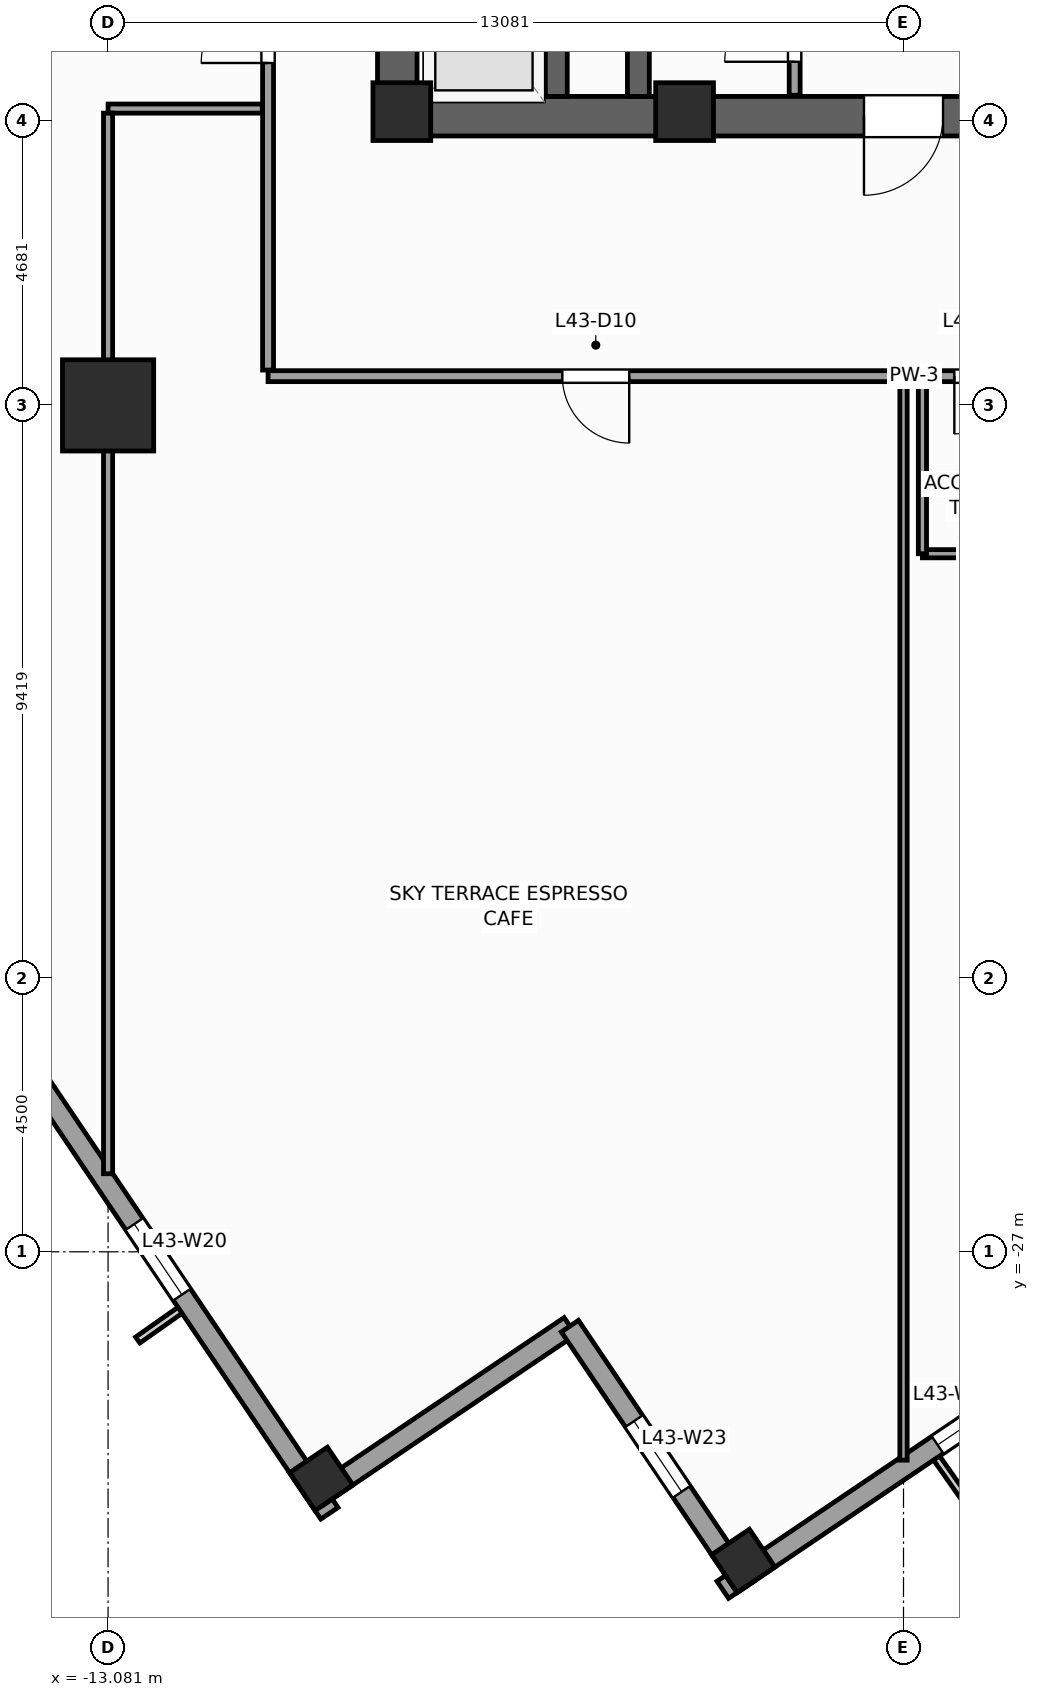
"""IFC4 building model, lengths in metres.
Left out: names, types, materials, properties, quantities, classifications, styles, units other than length and angle.
Written with IfcOpenShell. Run it as: python <this file> out.ifc"""

import sys

from ifc_helpers import new_model, si_unit, direction, frame, frame_2d, origin, origin_2d, place, context, subcontext, project, spatial, rectangle, extrude, source, transform, mapped, element, fill, save


model = new_model("IFC4")
c1 = context("Model", 3, precision=1e-05, world=origin(), true_north=direction((0.0, 1.0)))
c2 = subcontext(c1, "Body", "Model", "MODEL_VIEW")
j1 = project(units=[si_unit("LENGTHUNIT", "METRE"), si_unit("PLANEANGLEUNIT", "RADIAN")], contexts=[c1])
p1 = place(None, origin())
s1 = spatial("IfcSite", under=j1, at=p1, CompositionType="ELEMENT")
p2 = place(p1, origin())
s2 = spatial("IfcBuilding", under=s1, at=p2, CompositionType="ELEMENT")
p3 = place(p2, frame((0.0, 0.0, 180.4)))
s3 = spatial("IfcBuildingStorey", under=s2, at=p3, CompositionType="ELEMENT", Elevation=180.4)
p4 = place(p3, frame((-8.65, -8.325, 0.0), z_axis=(0.0, 0.0, 1.0), x_axis=(1.0, 0.0, 0.0)))
e1 = element("IfcWall", 1, at=p4, inside=s3, PredefinedType="SHEAR", context=c2, shape_type="SweptSolid", body=[
    extrude(rectangle(XDim=17.3, YDim=0.65, at=frame_2d((8.65, 0.0))), origin(), (0.0, 0.0, 1.0), 4.0),
])
p5 = place(p4, frame((8.0, 0.0, 0.0)))
e2 = element("IfcOpeningElement", 2, at=p5, cuts=e1, PredefinedType="OPENING", context=c2, shape_type="SweptSolid", body=[
    extrude(rectangle(XDim=1.3, YDim=2.2, at=frame_2d((0.65, 1.1))), frame((0.0, 0.335, 0.0), z_axis=(0.0, -1.0, 0.0), x_axis=(1.0, 0.0, 0.0)), (0.0, 0.0, 1.0), 0.67),
])
p6 = place(p3, frame((-8.325, -8.0, 0.0), z_axis=(0.0, 0.0, 1.0), x_axis=(0.0, 1.0, 0.0)))
e3 = element("IfcWall", 3, at=p6, inside=s3, PredefinedType="SHEAR", context=c2, shape_type="SweptSolid", body=[
    extrude(rectangle(XDim=16.0, YDim=0.65, at=frame_2d((8.0, 0.0))), origin(), (0.0, 0.0, 1.0), 4.0),
])
p7 = place(p6, frame((4.69, 0.0, 0.0)))
e4 = element("IfcOpeningElement", 4, at=p7, cuts=e3, PredefinedType="OPENING", context=c2, shape_type="SweptSolid", body=[
    extrude(rectangle(XDim=1.3, YDim=2.2, at=frame_2d((0.65, 1.1))), frame((0.0, 0.335, 0.0), z_axis=(0.0, -1.0, 0.0), x_axis=(1.0, 0.0, 0.0)), (0.0, 0.0, 1.0), 0.67),
])
p8 = place(p3, frame((-4.36, -8.0, 0.0), z_axis=(0.0, 0.0, 1.0), x_axis=(0.0, 1.0, 0.0)))
e5 = element("IfcWall", 5, at=p8, inside=s3, PredefinedType="SHEAR", context=c2, shape_type="SweptSolid", body=[
    extrude(rectangle(XDim=16.0, YDim=0.36, at=frame_2d((8.0, 0.0))), origin(), (0.0, 0.0, 1.0), 4.0),
])
p9 = place(p3, frame((-5.71, -8.0, 0.0), z_axis=(0.0, 0.0, 1.0), x_axis=(0.0, 1.0, 0.0)))
e6 = element("IfcWall", 6, at=p9, inside=s3, PredefinedType="SHEAR", context=c2, shape_type="SweptSolid", body=[
    extrude(rectangle(XDim=2.54, YDim=0.36, at=frame_2d((1.27, 0.0))), origin(), (0.0, 0.0, 1.0), 4.0),
])
m1 = source(origin(), c2, "Body", "SweptSolid", [
    extrude(rectangle(XDim=0.95, YDim=0.95, at=origin_2d()), origin(), (0.0, 0.0, 1.0), 4.0),
])
for number, where, z_axis, x_axis in (
    (7, (-8.25, -8.25, 0.0), (0.0, 0.0, 1.0), (1.0, 0.0, 0.0)),
    (8, (-3.6, -8.25, 0.0), (0.0, 0.0, 1.0), (1.0, 0.0, 0.0)),
):
    element("IfcColumn", number, at=place(p3, frame(where, z_axis=z_axis, x_axis=x_axis)), inside=s3, PredefinedType="PILASTER", context=c2, shape_type="MappedRepresentation", body=[
        mapped(m1, transform((0.0, 0.0, 0.0), scale=1.0)),
    ])
m2 = source(origin(), c2, "Body", "SweptSolid", [
    extrude(rectangle(XDim=1.5, YDim=1.5, at=origin_2d()), origin(), (0.0, 0.0, 1.0), 4.0),
])
p10 = place(p3, frame((-13.081, -13.081, 0.0), z_axis=(0.0, 0.0, 1.0), x_axis=(1.0, 0.0, 0.0)))
e9 = element("IfcColumn", 9, at=p10, inside=s3, PredefinedType="COLUMN", context=c2, shape_type="MappedRepresentation", body=[
    mapped(m2, transform((0.0, 0.0, 0.0), scale=1.0)),
])
m3 = source(origin(), c2, "Body", "SweptSolid", [
    extrude(rectangle(XDim=0.75, YDim=0.75, at=origin_2d()), origin(), (0.0, 0.0, 1.0), 4.0),
])
for number, where, z_axis, x_axis in (
    (10, (-2.635, -32.083, 0.0), (0.0, 0.0, 1.0), (0.829, 0.559, 0.0)),
    (11, (-9.576, -30.734, 0.0), (0.0, 0.0, 1.0), (0.829, 0.559, 0.0)),
):
    element("IfcColumn", number, at=place(p3, frame(where, z_axis=z_axis, x_axis=x_axis)), inside=s3, PredefinedType="COLUMN", context=c2, shape_type="MappedRepresentation", body=[
        mapped(m3, transform((0.0, 0.0, 0.0), scale=1.0)),
    ])
p11 = place(p3, frame((-2.972, -32.558, 0.0), z_axis=(0.0, 0.0, 1.0), x_axis=(0.829036218961, 0.559194910251, 0.0)))
e12 = element("IfcWall", 12, at=p11, inside=s3, PredefinedType="STANDARD", context=c2, shape_type="SweptSolid", body=[
    extrude(rectangle(XDim=41.34, YDim=0.34, at=frame_2d((20.67, 0.0))), origin(), (0.0, 0.0, 1.0), 3.04),
])
p12 = place(p11, frame((4.261, 0.0, 0.56)))
e13 = element("IfcOpeningElement", 13, at=p12, cuts=e12, PredefinedType="OPENING", context=c2, shape_type="SweptSolid", body=[
    extrude(rectangle(XDim=1.4, YDim=2.4, at=frame_2d((0.7, 1.2))), frame((0.0, 0.18, 0.0), z_axis=(0.0, -1.0, 0.0), x_axis=(1.0, 0.0, 0.0)), (0.0, 0.0, 1.0), 0.36),
])
p13 = place(p11, frame((11.064, 0.0, 0.61)))
e14 = element("IfcOpeningElement", 14, at=p13, cuts=e12, PredefinedType="OPENING", context=c2, shape_type="SweptSolid", body=[
    extrude(rectangle(XDim=1.85, YDim=2.35, at=frame_2d((0.925, 1.175))), frame((0.0, 0.18, 0.0), z_axis=(0.0, -1.0, 0.0), x_axis=(1.0, 0.0, 0.0)), (0.0, 0.0, 1.0), 0.36),
])
p14 = place(p11, frame((18.168, 0.0, 0.61)))
e15 = element("IfcOpeningElement", 15, at=p14, cuts=e12, PredefinedType="OPENING", context=c2, shape_type="SweptSolid", body=[
    extrude(rectangle(XDim=1.85, YDim=2.35, at=frame_2d((0.925, 1.175))), frame((0.0, 0.18, 0.0), z_axis=(0.0, -1.0, 0.0), x_axis=(1.0, 0.0, 0.0)), (0.0, 0.0, 1.0), 0.36),
])
p15 = place(p11, frame((27.186, 0.0, 0.61)))
e16 = element("IfcOpeningElement", 16, at=p15, cuts=e12, PredefinedType="OPENING", context=c2, shape_type="SweptSolid", body=[
    extrude(rectangle(XDim=1.85, YDim=2.35, at=frame_2d((0.925, 1.175))), frame((0.0, 0.18, 0.0), z_axis=(0.0, -1.0, 0.0), x_axis=(1.0, 0.0, 0.0)), (0.0, 0.0, 1.0), 0.36),
])
p16 = place(p11, frame((34.852, 0.0, 0.56)))
e17 = element("IfcOpeningElement", 17, at=p16, cuts=e12, PredefinedType="OPENING", context=c2, shape_type="SweptSolid", body=[
    extrude(rectangle(XDim=1.4, YDim=2.4, at=frame_2d((0.7, 1.2))), frame((0.0, 0.18, 0.0), z_axis=(0.0, -1.0, 0.0), x_axis=(1.0, 0.0, 0.0)), (0.0, 0.0, 1.0), 0.36),
])
p17 = place(p3, frame((-32.558, 2.972, 0.0), z_axis=(0.0, 0.0, 1.0), x_axis=(0.559194910251, -0.829036218961, 0.0)))
e18 = element("IfcWall", 18, at=p17, inside=s3, PredefinedType="STANDARD", context=c2, shape_type="SweptSolid", body=[
    extrude(rectangle(XDim=41.34, YDim=0.34, at=frame_2d((20.67, 0.0))), origin(), (0.0, 0.0, 1.0), 3.04),
])
p18 = place(p17, frame((25.745, 0.0, 0.0)))
e19 = element("IfcOpeningElement", 19, at=p18, cuts=e18, PredefinedType="OPENING", context=c2, shape_type="SweptSolid", body=[
    extrude(rectangle(XDim=1.05, YDim=2.25, at=frame_2d((0.525, 1.125))), frame((0.0, 0.18, 0.0), z_axis=(0.0, -1.0, 0.0), x_axis=(1.0, 0.0, 0.0)), (0.0, 0.0, 1.0), 0.36),
])
p19 = place(p17, frame((4.261, 0.0, 0.56)))
e20 = element("IfcOpeningElement", 20, at=p19, cuts=e18, PredefinedType="OPENING", context=c2, shape_type="SweptSolid", body=[
    extrude(rectangle(XDim=1.4, YDim=2.4, at=frame_2d((0.7, 1.2))), frame((0.0, 0.18, 0.0), z_axis=(0.0, -1.0, 0.0), x_axis=(1.0, 0.0, 0.0)), (0.0, 0.0, 1.0), 0.36),
])
p20 = place(p17, frame((11.064, 0.0, 0.61)))
e21 = element("IfcOpeningElement", 21, at=p20, cuts=e18, PredefinedType="OPENING", context=c2, shape_type="SweptSolid", body=[
    extrude(rectangle(XDim=1.85, YDim=2.35, at=frame_2d((0.925, 1.175))), frame((0.0, 0.18, 0.0), z_axis=(0.0, -1.0, 0.0), x_axis=(1.0, 0.0, 0.0)), (0.0, 0.0, 1.0), 0.36),
])
p21 = place(p17, frame((18.168, 0.0, 0.61)))
e22 = element("IfcOpeningElement", 22, at=p21, cuts=e18, PredefinedType="OPENING", context=c2, shape_type="SweptSolid", body=[
    extrude(rectangle(XDim=1.85, YDim=2.35, at=frame_2d((0.925, 1.175))), frame((0.0, 0.18, 0.0), z_axis=(0.0, -1.0, 0.0), x_axis=(1.0, 0.0, 0.0)), (0.0, 0.0, 1.0), 0.36),
])
p22 = place(p17, frame((27.936, 0.0, 0.61)))
e23 = element("IfcOpeningElement", 23, at=p22, cuts=e18, PredefinedType="OPENING", context=c2, shape_type="SweptSolid", body=[
    extrude(rectangle(XDim=1.85, YDim=2.35, at=frame_2d((0.925, 1.175))), frame((0.0, 0.18, 0.0), z_axis=(0.0, -1.0, 0.0), x_axis=(1.0, 0.0, 0.0)), (0.0, 0.0, 1.0), 0.36),
])
p23 = place(p17, frame((35.602, 0.0, 0.56)))
e24 = element("IfcOpeningElement", 24, at=p23, cuts=e18, PredefinedType="OPENING", context=c2, shape_type="SweptSolid", body=[
    extrude(rectangle(XDim=1.4, YDim=2.4, at=frame_2d((0.7, 1.2))), frame((0.0, 0.18, 0.0), z_axis=(0.0, -1.0, 0.0), x_axis=(1.0, 0.0, 0.0)), (0.0, 0.0, 1.0), 0.36),
])
p24 = place(p3, frame((-9.631, -31.019, 0.0), z_axis=(0.0, 0.0, 1.0), x_axis=(0.829025804298, 0.559210350234, 0.0)))
e25 = element("IfcWall", 25, at=p24, inside=s3, PredefinedType="STANDARD", context=c2, shape_type="SweptSolid", body=[
    extrude(rectangle(XDim=5.0, YDim=0.34, at=frame_2d((2.5, 0.0))), origin(), (0.0, 0.0, 1.0), 3.74),
])
p25 = place(p3, frame((-5.486, -28.223, 0.0), z_axis=(0.0, 0.0, 1.0), x_axis=(0.559171107879, -0.82905227345, 0.0)))
e26 = element("IfcWall", 26, at=p25, inside=s3, PredefinedType="STANDARD", context=c2, shape_type="SweptSolid", body=[
    extrude(rectangle(XDim=5.17, YDim=0.34, at=frame_2d((2.585, 0.0))), origin(), (0.0, 0.0, 1.0), 3.04),
])
p26 = place(p25, frame((1.885, 0.0, 0.56)))
e27 = element("IfcOpeningElement", 27, at=p26, cuts=e26, PredefinedType="OPENING", context=c2, shape_type="SweptSolid", body=[
    extrude(rectangle(XDim=1.4, YDim=2.4, at=frame_2d((0.7, 1.2))), frame((0.0, 0.18, 0.0), z_axis=(0.0, -1.0, 0.0), x_axis=(1.0, 0.0, 0.0)), (0.0, 0.0, 1.0), 0.36),
])
p27 = place(p3, frame((-1.79, -7.98, 0.0), z_axis=(0.0, 0.0, 1.0), x_axis=(0.0, 1.0, 0.0)))
e28 = element("IfcWall", 28, at=p27, inside=s3, PredefinedType="PARTITIONING", context=c2, shape_type="SweptSolid", body=[
    extrude(rectangle(XDim=12.38, YDim=0.18, at=frame_2d((6.19, 0.0))), origin(), (0.0, 0.0, 1.0), 3.74),
])
p28 = place(p27, frame((4.6, 0.0, 0.0)))
e29 = element("IfcOpeningElement", 29, at=p28, cuts=e28, PredefinedType="OPENING", context=c2, shape_type="SweptSolid", body=[
    extrude(rectangle(XDim=1.1, YDim=2.2, at=frame_2d((0.55, 1.1))), frame((0.0, 0.1, 0.0), z_axis=(0.0, -1.0, 0.0), x_axis=(1.0, 0.0, 0.0)), (0.0, 0.0, 1.0), 0.2),
])
p29 = place(p27, frame((6.66, 0.0, 0.0)))
e30 = element("IfcOpeningElement", 30, at=p29, cuts=e28, PredefinedType="OPENING", context=c2, shape_type="SweptSolid", body=[
    extrude(rectangle(XDim=1.1, YDim=2.2, at=frame_2d((0.55, 1.1))), frame((0.0, 0.1, 0.0), z_axis=(0.0, -1.0, 0.0), x_axis=(1.0, 0.0, 0.0)), (0.0, 0.0, 1.0), 0.2),
])
p30 = place(p27, frame((0.55, 0.0, 0.0)))
e31 = element("IfcOpeningElement", 31, at=p30, cuts=e28, PredefinedType="OPENING", context=c2, shape_type="SweptSolid", body=[
    extrude(rectangle(XDim=1.15, YDim=2.25, at=frame_2d((0.575, 1.125))), frame((0.0, 0.1, 0.0), z_axis=(0.0, -1.0, 0.0), x_axis=(1.0, 0.0, 0.0)), (0.0, 0.0, 1.0), 0.2),
])
p31 = place(p27, frame((2.72, 0.0, 0.0)))
e32 = element("IfcOpeningElement", 32, at=p31, cuts=e28, PredefinedType="OPENING", context=c2, shape_type="SweptSolid", body=[
    extrude(rectangle(XDim=0.88, YDim=2.1, at=frame_2d((0.44, 1.05))), frame((0.0, 0.1, 0.0), z_axis=(0.0, -1.0, 0.0), x_axis=(1.0, 0.0, 0.0)), (0.0, 0.0, 1.0), 0.2),
])
p32 = place(p3, frame((-10.45, -12.6, 0.0), z_axis=(0.0, 0.0, 1.0), x_axis=(1.0, 0.0, 0.0)))
e33 = element("IfcWall", 33, at=p32, inside=s3, PredefinedType="PARTITIONING", context=c2, shape_type="SweptSolid", body=[
    extrude(rectangle(XDim=22.0, YDim=0.18, at=frame_2d((11.0, 0.0))), origin(), (0.0, 0.0, 1.0), 3.74),
])
p33 = place(p32, frame((11.286, 0.0, 0.0)))
e34 = element("IfcOpeningElement", 34, at=p33, cuts=e33, PredefinedType="OPENING", context=c2, shape_type="SweptSolid", body=[
    extrude(rectangle(XDim=0.95, YDim=2.1, at=frame_2d((0.475, 1.05))), frame((0.0, 0.1, 0.0), z_axis=(0.0, -1.0, 0.0), x_axis=(1.0, 0.0, 0.0)), (0.0, 0.0, 1.0), 0.2),
])
p34 = place(p32, frame((4.839, 0.0, 0.0)))
e35 = element("IfcOpeningElement", 35, at=p34, cuts=e33, PredefinedType="OPENING", context=c2, shape_type="SweptSolid", body=[
    extrude(rectangle(XDim=1.1, YDim=2.2, at=frame_2d((0.55, 1.1))), frame((0.0, 0.1, 0.0), z_axis=(0.0, -1.0, 0.0), x_axis=(1.0, 0.0, 0.0)), (0.0, 0.0, 1.0), 0.2),
])
p35 = place(p32, frame((16.66, 0.0, 0.0)))
e36 = element("IfcOpeningElement", 36, at=p35, cuts=e33, PredefinedType="OPENING", context=c2, shape_type="SweptSolid", body=[
    extrude(rectangle(XDim=1.1, YDim=2.2, at=frame_2d((0.55, 1.1))), frame((0.0, 0.1, 0.0), z_axis=(0.0, -1.0, 0.0), x_axis=(1.0, 0.0, 0.0)), (0.0, 0.0, 1.0), 0.2),
])
p36 = place(p3, frame((-10.45, -12.5, 0.0), z_axis=(0.0, 0.0, 1.0), x_axis=(0.0, 1.0, 0.0)))
e37 = element("IfcWall", 37, at=p36, inside=s3, PredefinedType="PARTITIONING", context=c2, shape_type="SweptSolid", body=[
    extrude(rectangle(XDim=16.3, YDim=0.18, at=frame_2d((8.15, 0.0))), origin(), (0.0, 0.0, 1.0), 3.74),
])
p37 = place(p36, frame((14.26, 0.0, 0.0)))
e38 = element("IfcOpeningElement", 38, at=p37, cuts=e37, PredefinedType="OPENING", context=c2, shape_type="SweptSolid", body=[
    extrude(rectangle(XDim=1.1, YDim=2.2, at=frame_2d((0.55, 1.1))), frame((0.0, 0.1, 0.0), z_axis=(0.0, -1.0, 0.0), x_axis=(1.0, 0.0, 0.0)), (0.0, 0.0, 1.0), 0.2),
])
p38 = place(p36, frame((11.225, 0.0, 0.0)))
e39 = element("IfcOpeningElement", 39, at=p38, cuts=e37, PredefinedType="OPENING", context=c2, shape_type="SweptSolid", body=[
    extrude(rectangle(XDim=1.1, YDim=2.2, at=frame_2d((0.55, 1.1))), frame((0.0, 0.1, 0.0), z_axis=(0.0, -1.0, 0.0), x_axis=(1.0, 0.0, 0.0)), (0.0, 0.0, 1.0), 0.2),
])
p39 = place(p36, frame((7.85, 0.0, 0.0)))
e40 = element("IfcOpeningElement", 40, at=p39, cuts=e37, PredefinedType="OPENING", context=c2, shape_type="SweptSolid", body=[
    extrude(rectangle(XDim=1.1, YDim=2.2, at=frame_2d((0.55, 1.1))), frame((0.0, 0.1, 0.0), z_axis=(0.0, -1.0, 0.0), x_axis=(1.0, 0.0, 0.0)), (0.0, 0.0, 1.0), 0.2),
])
p40 = place(p36, frame((5.05, 0.0, 0.0)))
e41 = element("IfcOpeningElement", 41, at=p40, cuts=e37, PredefinedType="OPENING", context=c2, shape_type="SweptSolid", body=[
    extrude(rectangle(XDim=1.1, YDim=2.2, at=frame_2d((0.55, 1.1))), frame((0.0, 0.1, 0.0), z_axis=(0.0, -1.0, 0.0), x_axis=(1.0, 0.0, 0.0)), (0.0, 0.0, 1.0), 0.2),
])
p41 = place(p3, frame((-10.545, -8.2, 0.0), z_axis=(0.0, 0.0, 1.0), x_axis=(-1.0, 0.0, 0.0)))
e42 = element("IfcWall", 42, at=p41, inside=s3, PredefinedType="PARTITIONING", context=c2, shape_type="SweptSolid", body=[
    extrude(rectangle(XDim=2.536, YDim=0.15, at=frame_2d((1.268, 0.0))), origin(), (0.0, 0.0, 1.0), 3.74),
])
p42 = place(p3, frame((-13.081, -8.275, 0.0), z_axis=(0.0, 0.0, 1.0), x_axis=(0.0, -1.0, 0.0)))
e43 = element("IfcWall", 43, at=p42, inside=s3, PredefinedType="PARTITIONING", context=c2, shape_type="SweptSolid", body=[
    extrude(rectangle(XDim=17.441, YDim=0.15, at=frame_2d((8.721, 0.0))), origin(), (0.0, 0.0, 1.0), 2.84),
])
p43 = place(p3, frame((0.0, -30.427, 0.0), z_axis=(0.0, 0.0, 1.0), x_axis=(0.0, 1.0, 0.0)))
e44 = element("IfcWall", 44, at=p43, inside=s3, PredefinedType="PARTITIONING", context=c2, shape_type="SweptSolid", body=[
    extrude(rectangle(XDim=17.732, YDim=0.12, at=frame_2d((8.866, 0.0))), origin(), (0.0, 0.0, 1.0), 3.74),
])
p44 = place(p3, frame((0.311, -15.52, 0.0), z_axis=(0.0, 0.0, 1.0), x_axis=(1.0, 0.0, 0.0)))
e45 = element("IfcWall", 45, at=p44, inside=s3, PredefinedType="PARTITIONING", context=c2, shape_type="SweptSolid", body=[
    extrude(rectangle(XDim=2.0, YDim=0.135, at=frame_2d((1.0, 0.0))), origin(), (0.0, 0.0, 1.0), 3.74),
])
p45 = place(p3, frame((0.311, -15.52, 0.0), z_axis=(0.0, 0.0, 1.0), x_axis=(0.0, 1.0, 0.0)))
e46 = element("IfcWall", 46, at=p45, inside=s3, PredefinedType="PARTITIONING", context=c2, shape_type="SweptSolid", body=[
    extrude(rectangle(XDim=2.9, YDim=0.135, at=frame_2d((1.45, 0.0))), origin(), (0.0, 0.0, 1.0), 3.74),
])
m4 = source(origin(), c2, "Body", "SweptSolid", [
    extrude(rectangle(XDim=1.4, YDim=2.4, at=frame_2d((0.7, 1.2))), frame((0.0, 0.03, 0.0), z_axis=(0.0, -1.0, 0.0), x_axis=(1.0, 0.0, 0.0)), (0.0, 0.0, 1.0), 0.06),
])
p46 = place(p12, origin())
e47 = element("IfcWindow", 47, at=p46, inside=s3, PartitioningType="SINGLE_PANEL", PredefinedType="WINDOW", context=c2, shape_type="MappedRepresentation", body=[
    mapped(m4, transform((0.0, 0.0, 0.0), scale=1.0)),
])
fill(e13, e47)
p47 = place(p23, origin())
e48 = element("IfcWindow", 48, at=p47, inside=s3, PartitioningType="SINGLE_PANEL", PredefinedType="WINDOW", context=c2, shape_type="MappedRepresentation", body=[
    mapped(m4, transform((0.0, 0.0, 0.0), scale=1.0)),
])
fill(e24, e48)
p48 = place(p26, origin())
e49 = element("IfcWindow", 49, at=p48, inside=s3, PartitioningType="SINGLE_PANEL", PredefinedType="WINDOW", context=c2, shape_type="MappedRepresentation", body=[
    mapped(m4, transform((0.0, 0.0, 0.0), scale=1.0)),
])
fill(e27, e49)
m5 = source(origin(), c2, "Body", "SweptSolid", [
    extrude(rectangle(XDim=1.3, YDim=2.2, at=frame_2d((0.65, 1.1))), frame((0.0, 0.025, 0.0), z_axis=(0.0, -1.0, 0.0), x_axis=(1.0, 0.0, 0.0)), (0.0, 0.0, 1.0), 0.05),
])
p49 = place(p5, frame((1.3, 0.0, 0.0), z_axis=(0.0, 0.0, 1.0), x_axis=(-1.0, 0.0, 0.0)))
e50 = element("IfcDoor", 50, at=p49, inside=s3, OperationType="SINGLE_SWING_LEFT", PredefinedType="DOOR", context=c2, shape_type="MappedRepresentation", body=[
    mapped(m5, transform((0.0, 0.0, 0.0), scale=1.0)),
])
fill(e2, e50)
m6 = source(origin(), c2, "Body", "SweptSolid", [
    extrude(rectangle(XDim=1.15, YDim=2.25, at=frame_2d((0.575, 1.125))), frame((0.0, 0.025, 0.0), z_axis=(0.0, -1.0, 0.0), x_axis=(1.0, 0.0, 0.0)), (0.0, 0.0, 1.0), 0.05),
])
p50 = place(p30, origin())
e51 = element("IfcDoor", 51, at=p50, inside=s3, OperationType="SINGLE_SWING_LEFT", PredefinedType="DOOR", context=c2, shape_type="MappedRepresentation", body=[
    mapped(m6, transform((0.0, 0.0, 0.0), scale=1.0)),
])
fill(e31, e51)
m7 = source(origin(), c2, "Body", "SweptSolid", [
    extrude(rectangle(XDim=0.95, YDim=2.1, at=frame_2d((0.475, 1.05))), frame((0.0, 0.025, 0.0), z_axis=(0.0, -1.0, 0.0), x_axis=(1.0, 0.0, 0.0)), (0.0, 0.0, 1.0), 0.05),
])
p51 = place(p33, frame((0.95, 0.0, 0.0), z_axis=(0.0, 0.0, 1.0), x_axis=(-1.0, 0.0, 0.0)))
e52 = element("IfcDoor", 52, at=p51, inside=s3, OperationType="SINGLE_SWING_LEFT", PredefinedType="DOOR", context=c2, shape_type="MappedRepresentation", body=[
    mapped(m7, transform((0.0, 0.0, 0.0), scale=1.0)),
])
fill(e34, e52)
m8 = source(origin(), c2, "Body", "SweptSolid", [
    extrude(rectangle(XDim=1.1, YDim=2.2, at=frame_2d((0.55, 1.1))), frame((0.0, 0.025, 0.0), z_axis=(0.0, -1.0, 0.0), x_axis=(1.0, 0.0, 0.0)), (0.0, 0.0, 1.0), 0.05),
])
p52 = place(p40, origin())
e53 = element("IfcDoor", 53, at=p52, inside=s3, OperationType="SINGLE_SWING_LEFT", PredefinedType="DOOR", context=c2, shape_type="MappedRepresentation", body=[
    mapped(m8, transform((0.0, 0.0, 0.0), scale=1.0)),
])
fill(e41, e53)
p53 = place(p34, frame((1.1, 0.0, 0.0), z_axis=(0.0, 0.0, 1.0), x_axis=(-1.0, 0.0, 0.0)))
e54 = element("IfcDoor", 54, at=p53, inside=s3, OperationType="SINGLE_SWING_RIGHT", PredefinedType="DOOR", context=c2, shape_type="MappedRepresentation", body=[
    mapped(m8, transform((0.0, 0.0, 0.0), scale=1.0)),
])
fill(e35, e54)
save(model, sys.argv[1])
